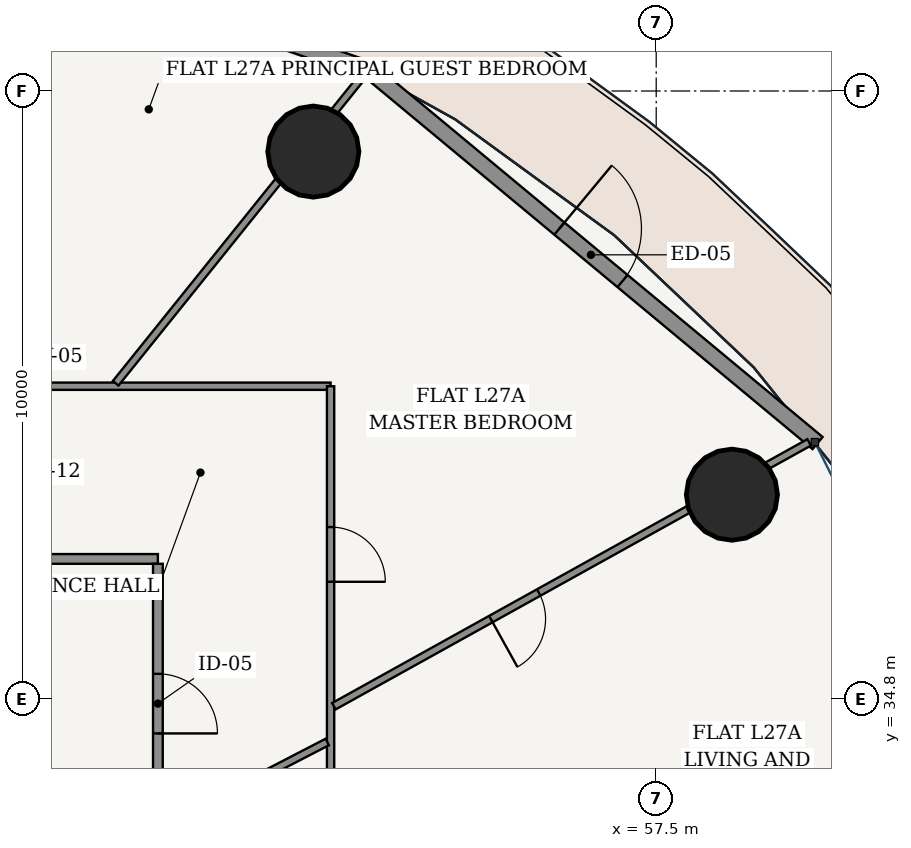
"""IFC4 building model, lengths in metres.
Left out: names, types, materials, properties, quantities, classifications, styles, units other than length and angle.
Written with IfcOpenShell. Run it as: python <this file> out.ifc"""

import sys

from ifc_helpers import new_model, si_unit, direction, frame, frame_2d, origin, origin_2d, place, context, subcontext, project, spatial, rectangle, hollow_circle, extrude, source, transform, mapped, element, fill, save


model = new_model("IFC4")
c1 = context("Model", 3, precision=1e-05, world=origin(), true_north=direction((-0.2419218956, 0.970295726276)))
c2 = subcontext(c1, "Body", "Model", "MODEL_VIEW")
j1 = project(units=[si_unit("LENGTHUNIT", "METRE"), si_unit("PLANEANGLEUNIT", "RADIAN")], contexts=[c1])
p1 = place(None, origin())
s1 = spatial("IfcSite", under=j1, at=p1, CompositionType="ELEMENT")
p2 = place(p1, origin())
s2 = spatial("IfcBuilding", under=s1, at=p2, CompositionType="ELEMENT")
p3 = place(p2, frame((0.0, 0.0, 105.0)))
s3 = spatial("IfcBuildingStorey", under=s2, at=p3, CompositionType="ELEMENT", Elevation=105.0)
for number, where, z_axis, x_axis in (
    (1, (58.745, 38.161, 0.0), (0.0, 0.0, 1.0), (1.0, 0.0, 0.0)),
    (2, (51.862, 43.803, 0.0), (0.0, 0.0, 1.0), (1.0, 0.0, 0.0)),
):
    element("IfcColumn", number, at=place(p3, frame(where, z_axis=z_axis, x_axis=x_axis)), inside=s3, PredefinedType="COLUMN", context=c2, shape_type="SweptSolid", body=[
        extrude(hollow_circle(Radius=0.75, WallThickness=0.045, at=origin_2d()), origin(), (0.0, 0.0, 1.0), 3.6),
    ])
p4 = place(p3, frame((60.154, 39.01, 0.0), z_axis=(0.0, 0.0, 1.0), x_axis=(-0.769242574941, 0.638956853706, 0.0)))
e3 = element("IfcWall", 3, at=p4, inside=s3, PredefinedType="SOLIDWALL", context=c2, shape_type="SweptSolid", body=[
    extrude(rectangle(XDim=9.69, YDim=0.26, at=frame_2d((4.845, 0.0))), origin(), (0.0, 0.0, 1.0), 3.325),
])
p5 = place(p4, frame((4.17, 0.0, 0.0)))
e4 = element("IfcOpeningElement", 4, at=p5, cuts=e3, PredefinedType="OPENING", context=c2, shape_type="SweptSolid", body=[
    extrude(rectangle(XDim=1.35, YDim=2.2, at=frame_2d((0.675, 1.1))), frame((0.0, 0.14, 0.0), z_axis=(0.0, -1.0, 0.0), x_axis=(1.0, 0.0, 0.0)), (0.0, 0.0, 1.0), 0.28),
])
p6 = place(p3, frame((52.837, 45.125, 0.0), z_axis=(0.0, 0.0, 1.0), x_axis=(-0.945597432299, 0.325339047809, 0.0)))
e5 = element("IfcWall", 5, at=p6, inside=s3, PredefinedType="SOLIDWALL", context=c2, shape_type="SweptSolid", body=[
    extrude(rectangle(XDim=10.289, YDim=0.28, at=frame_2d((5.145, 0.0))), origin(), (0.0, 0.0, 1.0), 3.325),
])
p7 = place(p6, frame((1.728, 0.0, 0.85)))
e6 = element("IfcOpeningElement", 6, at=p7, cuts=e5, PredefinedType="OPENING", context=c2, shape_type="SweptSolid", body=[
    extrude(rectangle(XDim=2.1, YDim=1.95, at=frame_2d((1.05, 0.975))), frame((0.0, 0.15, 0.0), z_axis=(0.0, -1.0, 0.0), x_axis=(1.0, 0.0, 0.0)), (0.0, 0.0, 1.0), 0.3),
])
p8 = place(p6, frame((6.461, 0.0, 0.85)))
e7 = element("IfcOpeningElement", 7, at=p8, cuts=e5, PredefinedType="OPENING", context=c2, shape_type="SweptSolid", body=[
    extrude(rectangle(XDim=2.1, YDim=1.95, at=frame_2d((1.05, 0.975))), frame((0.0, 0.15, 0.0), z_axis=(0.0, -1.0, 0.0), x_axis=(1.0, 0.0, 0.0)), (0.0, 0.0, 1.0), 0.3),
])
p9 = place(p3, frame((26.695, 37.105, 0.0), z_axis=(0.0, 0.0, 1.0), x_axis=(1.0, 0.0, 0.0)))
e8 = element("IfcWall", 8, at=p9, inside=s3, PredefinedType="PARTITIONING", context=c2, shape_type="SweptSolid", body=[
    extrude(rectangle(XDim=22.61, YDim=0.16, at=frame_2d((11.305, 0.0))), origin(), (0.0, 0.0, 1.0), 2.767),
])
p10 = place(p9, frame((4.925, 0.0, 0.0)))
e9 = element("IfcOpeningElement", 9, at=p10, cuts=e8, PredefinedType="OPENING", context=c2, shape_type="SweptSolid", body=[
    extrude(rectangle(XDim=0.98, YDim=2.2, at=frame_2d((0.49, 1.1))), frame((0.0, 0.09, 0.0), z_axis=(0.0, -1.0, 0.0), x_axis=(1.0, 0.0, 0.0)), (0.0, 0.0, 1.0), 0.18),
])
p11 = place(p3, frame((49.305, 16.575, 0.0), z_axis=(0.0, 0.0, 1.0), x_axis=(0.0, 1.0, 0.0)))
e10 = element("IfcWall", 10, at=p11, inside=s3, PredefinedType="PARTITIONING", context=c2, shape_type="SweptSolid", body=[
    extrude(rectangle(XDim=20.45, YDim=0.16, at=frame_2d((10.225, 0.0))), origin(), (0.0, 0.0, 1.0), 2.767),
])
p12 = place(p11, frame((17.66, 0.0, 0.0)))
e11 = element("IfcOpeningElement", 11, at=p12, cuts=e10, PredefinedType="OPENING", context=c2, shape_type="SweptSolid", body=[
    extrude(rectangle(XDim=0.98, YDim=2.2, at=frame_2d((0.49, 1.1))), frame((0.0, 0.09, 0.0), z_axis=(0.0, -1.0, 0.0), x_axis=(1.0, 0.0, 0.0)), (0.0, 0.0, 1.0), 0.18),
])
p13 = place(p3, frame((41.249, 39.945, 0.0), z_axis=(0.0, 0.0, 1.0), x_axis=(1.0, 0.0, 0.0)))
e12 = element("IfcWall", 12, at=p13, inside=s3, PredefinedType="PARTITIONING", context=c2, shape_type="SweptSolid", body=[
    extrude(rectangle(XDim=10.896, YDim=0.12, at=frame_2d((5.448, 0.0))), origin(), (0.0, 0.0, 1.0), 2.767),
])
p14 = place(p13, frame((1.336, 0.0, 0.0)))
e13 = element("IfcOpeningElement", 13, at=p14, cuts=e12, PredefinedType="OPENING", context=c2, shape_type="SweptSolid", body=[
    extrude(rectangle(XDim=0.9, YDim=2.15, at=frame_2d((0.45, 1.075))), frame((0.0, 0.07, 0.0), z_axis=(0.0, -1.0, 0.0), x_axis=(1.0, 0.0, 0.0)), (0.0, 0.0, 1.0), 0.14),
])
p15 = place(p3, frame((52.145, 39.945, 0.0), z_axis=(0.0, 0.0, 1.0), x_axis=(0.0, -1.0, 0.0)))
e14 = element("IfcWall", 14, at=p15, inside=s3, PredefinedType="PARTITIONING", context=c2, shape_type="SweptSolid", body=[
    extrude(rectangle(XDim=10.705, YDim=0.12, at=frame_2d((5.353, 0.0))), origin(), (0.0, 0.0, 1.0), 2.767),
])
p16 = place(p15, frame((2.316, 0.0, 0.0)))
e15 = element("IfcOpeningElement", 15, at=p16, cuts=e14, PredefinedType="OPENING", context=c2, shape_type="SweptSolid", body=[
    extrude(rectangle(XDim=0.9, YDim=2.15, at=frame_2d((0.45, 1.075))), frame((0.0, 0.07, 0.0), z_axis=(0.0, -1.0, 0.0), x_axis=(1.0, 0.0, 0.0)), (0.0, 0.0, 1.0), 0.14),
])
p17 = place(p3, frame((52.199, 34.683, 0.0), z_axis=(0.0, 0.0, 1.0), x_axis=(0.874320827228, 0.485348422349, 0.0)))
e16 = element("IfcWall", 16, at=p17, inside=s3, PredefinedType="PARTITIONING", context=c2, shape_type="SweptSolid", body=[
    extrude(rectangle(XDim=8.94, YDim=0.12, at=frame_2d((4.47, 0.0))), origin(), (0.0, 0.0, 1.0), 2.767),
])
p18 = place(p17, frame((2.953, 0.0, 0.0)))
e17 = element("IfcOpeningElement", 17, at=p18, cuts=e16, PredefinedType="OPENING", context=c2, shape_type="SweptSolid", body=[
    extrude(rectangle(XDim=0.9, YDim=2.15, at=frame_2d((0.45, 1.075))), frame((0.0, 0.07, 0.0), z_axis=(0.0, -1.0, 0.0), x_axis=(1.0, 0.0, 0.0)), (0.0, 0.0, 1.0), 0.14),
])
p19 = place(p3, frame((48.611, 39.993, 0.0), z_axis=(0.0, 0.0, 1.0), x_axis=(0.626719700294, 0.779244773651, 0.0)))
e18 = element("IfcWall", 18, at=p19, inside=s3, PredefinedType="PARTITIONING", context=c2, shape_type="SweptSolid", body=[
    extrude(rectangle(XDim=6.537, YDim=0.12, at=frame_2d((3.269, 0.0))), origin(), (0.0, 0.0, 1.0), 2.767),
])
p20 = place(p3, frame((44.581, 40.0, 0.0), z_axis=(0.0, 0.0, 1.0), x_axis=(0.446188142997, 0.894939182877, 0.0)))
e19 = element("IfcWall", 19, at=p20, inside=s3, PredefinedType="PARTITIONING", context=c2, shape_type="SweptSolid", body=[
    extrude(rectangle(XDim=8.002, YDim=0.12, at=frame_2d((4.001, 0.0))), origin(), (0.0, 0.0, 1.0), 2.767),
])
p21 = place(p20, frame((3.551, 0.0, 0.0)))
e20 = element("IfcOpeningElement", 20, at=p21, cuts=e19, PredefinedType="OPENING", context=c2, shape_type="SweptSolid", body=[
    extrude(rectangle(XDim=0.9, YDim=2.15, at=frame_2d((0.45, 1.075))), frame((0.0, 0.07, 0.0), z_axis=(0.0, -1.0, 0.0), x_axis=(1.0, 0.0, 0.0)), (0.0, 0.0, 1.0), 0.14),
])
p22 = place(p3, frame((49.387, 32.695, 0.0), z_axis=(0.0, 0.0, 1.0), x_axis=(0.888050549489, 0.459745822767, 0.0)))
e21 = element("IfcWall", 21, at=p22, inside=s3, PredefinedType="PARTITIONING", context=c2, shape_type="SweptSolid", body=[
    extrude(rectangle(XDim=3.044, YDim=0.12, at=frame_2d((1.522, 0.0))), origin(), (0.0, 0.0, 1.0), 3.325),
])
p23 = place(p22, frame((1.092, 0.0, 0.0)))
e22 = element("IfcOpeningElement", 22, at=p23, cuts=e21, PredefinedType="OPENING", context=c2, shape_type="SweptSolid", body=[
    extrude(rectangle(XDim=0.86, YDim=2.15, at=frame_2d((0.43, 1.075))), frame((0.0, 0.07, 0.0), z_axis=(0.0, -1.0, 0.0), x_axis=(1.0, 0.0, 0.0)), (0.0, 0.0, 1.0), 0.14),
])
m1 = source(origin(), c2, "Body", "SweptSolid", [
    extrude(rectangle(XDim=1.35, YDim=2.2, at=frame_2d((0.675, 1.1))), frame((0.0, 0.025, 0.0), z_axis=(0.0, -1.0, 0.0), x_axis=(1.0, 0.0, 0.0)), (0.0, 0.0, 1.0), 0.05),
])
p24 = place(p5, frame((1.35, 0.0, 0.0), z_axis=(0.0, 0.0, 1.0), x_axis=(-1.0, 0.0, 0.0)))
e23 = element("IfcDoor", 23, at=p24, inside=s3, OperationType="SINGLE_SWING_LEFT", PredefinedType="DOOR", context=c2, shape_type="MappedRepresentation", body=[
    mapped(m1, transform((0.0, 0.0, 0.0), scale=1.0)),
])
fill(e4, e23)
m2 = source(origin(), c2, "Body", "SweptSolid", [
    extrude(rectangle(XDim=0.98, YDim=2.2, at=frame_2d((0.49, 1.1))), frame((0.0, 0.025, 0.0), z_axis=(0.0, -1.0, 0.0), x_axis=(1.0, 0.0, 0.0)), (0.0, 0.0, 1.0), 0.05),
])
p25 = place(p12, frame((0.98, 0.0, 0.0), z_axis=(0.0, 0.0, 1.0), x_axis=(-1.0, 0.0, 0.0)))
e24 = element("IfcDoor", 24, at=p25, inside=s3, OperationType="SINGLE_SWING_RIGHT", PredefinedType="DOOR", context=c2, shape_type="MappedRepresentation", body=[
    mapped(m2, transform((0.0, 0.0, 0.0), scale=1.0)),
])
fill(e11, e24)
m3 = source(origin(), c2, "Body", "SweptSolid", [
    extrude(rectangle(XDim=0.9, YDim=2.15, at=frame_2d((0.45, 1.075))), frame((0.0, 0.025, 0.0), z_axis=(0.0, -1.0, 0.0), x_axis=(1.0, 0.0, 0.0)), (0.0, 0.0, 1.0), 0.05),
])
p26 = place(p16, origin())
e25 = element("IfcDoor", 25, at=p26, inside=s3, OperationType="SINGLE_SWING_RIGHT", PredefinedType="DOOR", context=c2, shape_type="MappedRepresentation", body=[
    mapped(m3, transform((0.0, 0.0, 0.0), scale=1.0)),
])
fill(e15, e25)
p27 = place(p18, frame((0.9, 0.0, 0.0), z_axis=(0.0, 0.0, 1.0), x_axis=(-1.0, 0.0, 0.0)))
e26 = element("IfcDoor", 26, at=p27, inside=s3, OperationType="SINGLE_SWING_RIGHT", PredefinedType="DOOR", context=c2, shape_type="MappedRepresentation", body=[
    mapped(m3, transform((0.0, 0.0, 0.0), scale=1.0)),
])
fill(e17, e26)
save(model, sys.argv[1])
